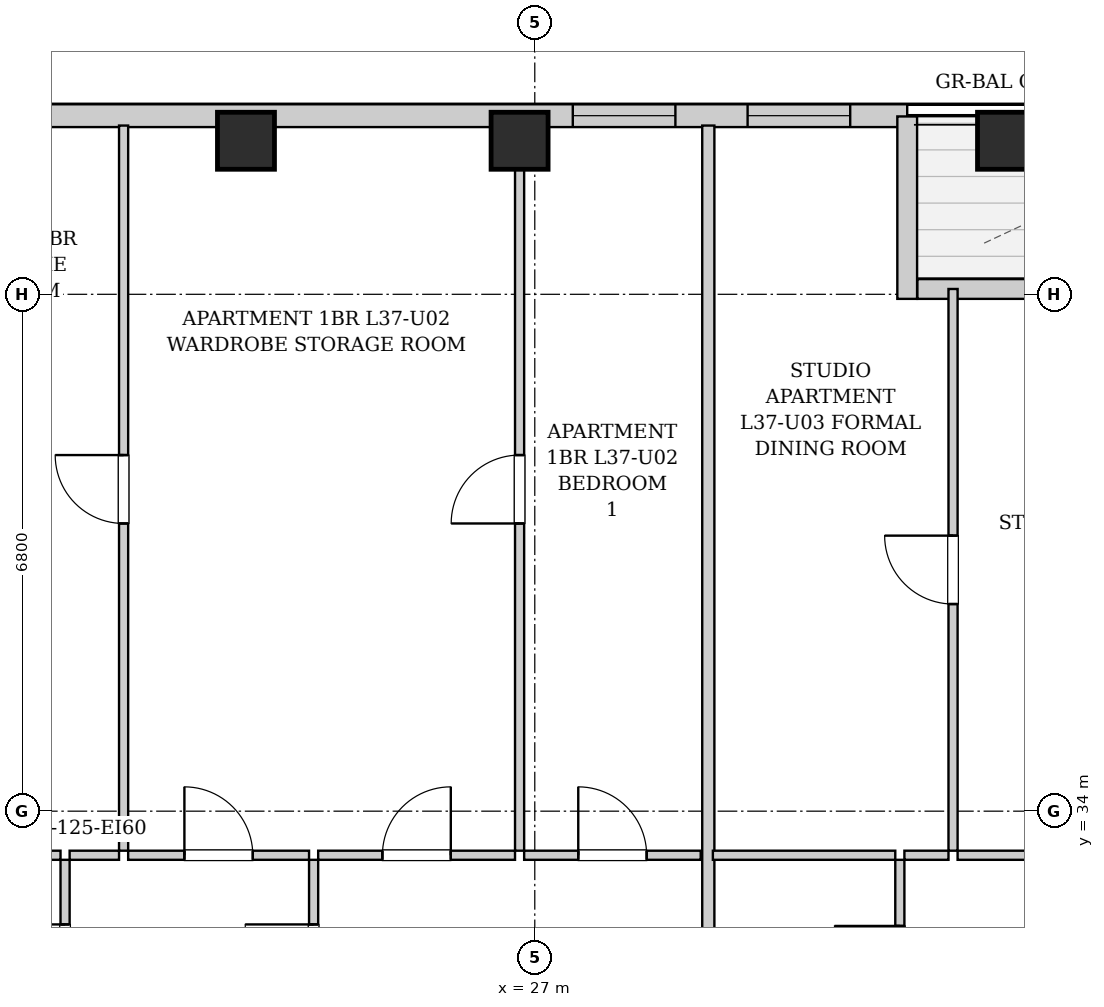
"""IFC4 building model, lengths in metres.
Left out: names, types, materials, properties, quantities, classifications, styles, units other than length and angle.
Written with IfcOpenShell. Run it as: python <this file> out.ifc"""

import sys

from ifc_helpers import new_model, si_unit, direction, frame, frame_2d, origin, origin_2d, place, context, subcontext, project, spatial, rectangle, extrude, element, fill, save


model = new_model("IFC4")
c1 = context("Model", 3, precision=1e-05, world=origin(), true_north=direction((0.0, 1.0)))
c2 = subcontext(c1, "Body", "Model", "MODEL_VIEW")
j1 = project(units=[si_unit("LENGTHUNIT", "METRE"), si_unit("PLANEANGLEUNIT", "RADIAN")], contexts=[c1])
p1 = place(None, origin())
s1 = spatial("IfcSite", under=j1, at=p1, CompositionType="ELEMENT")
p2 = place(p1, origin())
s2 = spatial("IfcBuilding", under=s1, at=p2, CompositionType="ELEMENT")
p3 = place(p2, frame((0.0, 0.0, 130.9)))
s3 = spatial("IfcBuildingStorey", under=s2, at=p3, CompositionType="ELEMENT", Elevation=130.9)
for number, where, z_axis, x_axis in (
    (1, (23.2, 42.82, 0.0), (0.0, 0.0, 1.0), (1.0, 0.0, 0.0)),
    (2, (26.8, 42.82, 0.0), (0.0, 0.0, 1.0), (1.0, 0.0, 0.0)),
    (3, (33.2, 42.82, 0.0), (0.0, 0.0, 1.0), (1.0, 0.0, 0.0)),
):
    element("IfcColumn", number, at=place(p3, frame(where, z_axis=z_axis, x_axis=x_axis)), inside=s3, PredefinedType="COLUMN", context=c2, shape_type="SweptSolid", body=[
        extrude(rectangle(XDim=0.75, YDim=0.75, at=origin_2d()), origin(), (0.0, 0.0, 1.0), 3.25),
    ])
p4 = place(p3, frame((10.0, 43.15, 0.0), z_axis=(0.0, 0.0, 1.0), x_axis=(1.0, 0.0, 0.0)))
e4 = element("IfcWall", 4, at=p4, inside=s3, PredefinedType="SOLIDWALL", context=c2, shape_type="SweptSolid", body=[
    extrude(rectangle(XDim=21.9, YDim=0.3, at=frame_2d((10.95, 0.0))), origin(), (0.0, 0.0, 1.0), 2.99),
])
p5 = place(p4, frame((5.475, 0.0, 0.55)))
e5 = element("IfcOpeningElement", 5, at=p5, cuts=e4, PredefinedType="OPENING", context=c2, shape_type="SweptSolid", body=[
    extrude(rectangle(XDim=1.35, YDim=1.2, at=frame_2d((0.675, 0.6))), frame((0.0, 0.16, 0.0), z_axis=(0.0, -1.0, 0.0), x_axis=(1.0, 0.0, 0.0)), (0.0, 0.0, 1.0), 0.32),
])
p6 = place(p4, frame((9.15, 0.0, 0.55)))
e6 = element("IfcOpeningElement", 6, at=p6, cuts=e4, PredefinedType="OPENING", context=c2, shape_type="SweptSolid", body=[
    extrude(rectangle(XDim=1.35, YDim=1.2, at=frame_2d((0.675, 0.6))), frame((0.0, 0.16, 0.0), z_axis=(0.0, -1.0, 0.0), x_axis=(1.0, 0.0, 0.0)), (0.0, 0.0, 1.0), 0.32),
])
p7 = place(p4, frame((17.5, 0.0, 0.55)))
e7 = element("IfcOpeningElement", 7, at=p7, cuts=e4, PredefinedType="OPENING", context=c2, shape_type="SweptSolid", body=[
    extrude(rectangle(XDim=1.35, YDim=1.2, at=frame_2d((0.675, 0.6))), frame((0.0, 0.16, 0.0), z_axis=(0.0, -1.0, 0.0), x_axis=(1.0, 0.0, 0.0)), (0.0, 0.0, 1.0), 0.32),
])
p8 = place(p4, frame((19.8, 0.0, 0.55)))
e8 = element("IfcOpeningElement", 8, at=p8, cuts=e4, PredefinedType="OPENING", context=c2, shape_type="SweptSolid", body=[
    extrude(rectangle(XDim=1.35, YDim=1.2, at=frame_2d((0.675, 0.6))), frame((0.0, 0.16, 0.0), z_axis=(0.0, -1.0, 0.0), x_axis=(1.0, 0.0, 0.0)), (0.0, 0.0, 1.0), 0.32),
])
p9 = place(p3, frame((31.9, 43.14, 0.0), z_axis=(0.0, 0.0, 1.0), x_axis=(0.0, -1.0, 0.0)))
e9 = element("IfcWall", 9, at=p9, inside=s3, PredefinedType="SOLIDWALL", context=c2, shape_type="SweptSolid", body=[
    extrude(rectangle(XDim=2.4, YDim=0.26, at=frame_2d((1.2, 0.0))), origin(), (0.0, 0.0, 1.0), 2.99),
])
p10 = place(p3, frame((32.034, 40.87, 0.0), z_axis=(0.0, 0.0, 1.0), x_axis=(1.0, 0.0, 0.0)))
e10 = element("IfcWall", 10, at=p10, inside=s3, PredefinedType="SOLIDWALL", context=c2, shape_type="SweptSolid", body=[
    extrude(rectangle(XDim=4.332, YDim=0.26, at=frame_2d((2.166, 0.0))), origin(), (0.0, 0.0, 1.0), 2.99),
])
p11 = place(p10, frame((1.616, 0.0, 0.0)))
e11 = element("IfcOpeningElement", 11, at=p11, cuts=e10, PredefinedType="OPENING", context=c2, shape_type="SweptSolid", body=[
    extrude(rectangle(XDim=1.1, YDim=2.0, at=frame_2d((0.55, 1.0))), frame((0.0, 0.14, 0.0), z_axis=(0.0, -1.0, 0.0), x_axis=(1.0, 0.0, 0.0)), (0.0, 0.0, 1.0), 0.28),
])
p12 = place(p3, frame((20.82, 30.76, 0.0), z_axis=(0.0, 0.0, 1.0), x_axis=(0.0, 1.0, 0.0)))
e12 = element("IfcWall", 12, at=p12, inside=s3, PredefinedType="PARTITIONING", context=c2, shape_type="SweptSolid", body=[
    extrude(rectangle(XDim=2.6, YDim=0.12, at=frame_2d((1.3, 0.0))), origin(), (0.0, 0.0, 1.0), 2.99),
])
p13 = place(p12, frame((0.85, 0.0, 0.0)))
e13 = element("IfcOpeningElement", 13, at=p13, cuts=e12, PredefinedType="OPENING", context=c2, shape_type="SweptSolid", body=[
    extrude(rectangle(XDim=0.9, YDim=2.05, at=frame_2d((0.45, 1.025))), frame((0.0, 0.07, 0.0), z_axis=(0.0, -1.0, 0.0), x_axis=(1.0, 0.0, 0.0)), (0.0, 0.0, 1.0), 0.14),
])
p14 = place(p3, frame((18.165, 33.42, 0.0), z_axis=(0.0, 0.0, 1.0), x_axis=(1.0, 0.0, 0.0)))
e14 = element("IfcWall", 14, at=p14, inside=s3, PredefinedType="PARTITIONING", context=c2, shape_type="SweptSolid", body=[
    extrude(rectangle(XDim=2.595, YDim=0.12, at=frame_2d((1.297, 0.0))), origin(), (0.0, 0.0, 1.0), 2.99),
])
p15 = place(p14, frame((0.847, 0.0, 0.0)))
e15 = element("IfcOpeningElement", 15, at=p15, cuts=e14, PredefinedType="OPENING", context=c2, shape_type="SweptSolid", body=[
    extrude(rectangle(XDim=0.9, YDim=2.05, at=frame_2d((0.45, 1.025))), frame((0.0, 0.07, 0.0), z_axis=(0.0, -1.0, 0.0), x_axis=(1.0, 0.0, 0.0)), (0.0, 0.0, 1.0), 0.14),
])
p16 = place(p3, frame((24.09, 30.76, 0.0), z_axis=(0.0, 0.0, 1.0), x_axis=(0.0, 1.0, 0.0)))
e16 = element("IfcWall", 16, at=p16, inside=s3, PredefinedType="PARTITIONING", context=c2, shape_type="SweptSolid", body=[
    extrude(rectangle(XDim=2.6, YDim=0.12, at=frame_2d((1.3, 0.0))), origin(), (0.0, 0.0, 1.0), 2.99),
])
p17 = place(p16, frame((0.85, 0.0, 0.0)))
e17 = element("IfcOpeningElement", 17, at=p17, cuts=e16, PredefinedType="OPENING", context=c2, shape_type="SweptSolid", body=[
    extrude(rectangle(XDim=0.9, YDim=2.05, at=frame_2d((0.45, 1.025))), frame((0.0, 0.07, 0.0), z_axis=(0.0, -1.0, 0.0), x_axis=(1.0, 0.0, 0.0)), (0.0, 0.0, 1.0), 0.14),
])
p18 = place(p3, frame((20.88, 33.42, 0.0), z_axis=(0.0, 0.0, 1.0), x_axis=(1.0, 0.0, 0.0)))
e18 = element("IfcWall", 18, at=p18, inside=s3, PredefinedType="PARTITIONING", context=c2, shape_type="SweptSolid", body=[
    extrude(rectangle(XDim=0.65, YDim=0.12, at=frame_2d((0.325, 0.0))), origin(), (0.0, 0.0, 1.0), 2.99),
])
p19 = place(p3, frame((21.65, 33.42, 0.0), z_axis=(0.0, 0.0, 1.0), x_axis=(1.0, 0.0, 0.0)))
e19 = element("IfcWall", 19, at=p19, inside=s3, PredefinedType="PARTITIONING", context=c2, shape_type="SweptSolid", body=[
    extrude(rectangle(XDim=2.38, YDim=0.12, at=frame_2d((1.19, 0.0))), origin(), (0.0, 0.0, 1.0), 2.99),
])
p20 = place(p19, frame((0.74, 0.0, 0.0)))
e20 = element("IfcOpeningElement", 20, at=p20, cuts=e19, PredefinedType="OPENING", context=c2, shape_type="SweptSolid", body=[
    extrude(rectangle(XDim=0.9, YDim=2.05, at=frame_2d((0.45, 1.025))), frame((0.0, 0.07, 0.0), z_axis=(0.0, -1.0, 0.0), x_axis=(1.0, 0.0, 0.0)), (0.0, 0.0, 1.0), 0.14),
])
p21 = place(p3, frame((24.15, 33.42, 0.0), z_axis=(0.0, 0.0, 1.0), x_axis=(1.0, 0.0, 0.0)))
e21 = element("IfcWall", 21, at=p21, inside=s3, PredefinedType="PARTITIONING", context=c2, shape_type="SweptSolid", body=[
    extrude(rectangle(XDim=2.59, YDim=0.12, at=frame_2d((1.295, 0.0))), origin(), (0.0, 0.0, 1.0), 2.99),
])
p22 = place(p21, frame((0.845, 0.0, 0.0)))
e22 = element("IfcOpeningElement", 22, at=p22, cuts=e21, PredefinedType="OPENING", context=c2, shape_type="SweptSolid", body=[
    extrude(rectangle(XDim=0.9, YDim=2.05, at=frame_2d((0.45, 1.025))), frame((0.0, 0.07, 0.0), z_axis=(0.0, -1.0, 0.0), x_axis=(1.0, 0.0, 0.0)), (0.0, 0.0, 1.0), 0.14),
])
p23 = place(p3, frame((26.86, 33.42, 0.0), z_axis=(0.0, 0.0, 1.0), x_axis=(1.0, 0.0, 0.0)))
e23 = element("IfcWall", 23, at=p23, inside=s3, PredefinedType="PARTITIONING", context=c2, shape_type="SweptSolid", body=[
    extrude(rectangle(XDim=2.323, YDim=0.12, at=frame_2d((1.162, 0.0))), origin(), (0.0, 0.0, 1.0), 2.99),
])
p24 = place(p23, frame((0.712, 0.0, 0.0)))
e24 = element("IfcOpeningElement", 24, at=p24, cuts=e23, PredefinedType="OPENING", context=c2, shape_type="SweptSolid", body=[
    extrude(rectangle(XDim=0.9, YDim=2.05, at=frame_2d((0.45, 1.025))), frame((0.0, 0.07, 0.0), z_axis=(0.0, -1.0, 0.0), x_axis=(1.0, 0.0, 0.0)), (0.0, 0.0, 1.0), 0.14),
])
p25 = place(p3, frame((21.59, 33.48, 0.0), z_axis=(0.0, 0.0, 1.0), x_axis=(0.0, 1.0, 0.0)))
e25 = element("IfcWall", 25, at=p25, inside=s3, PredefinedType="PARTITIONING", context=c2, shape_type="SweptSolid", body=[
    extrude(rectangle(XDim=9.54, YDim=0.12, at=frame_2d((4.77, 0.0))), origin(), (0.0, 0.0, 1.0), 2.99),
])
p26 = place(p25, frame((4.305, 0.0, 0.0)))
e26 = element("IfcOpeningElement", 26, at=p26, cuts=e25, PredefinedType="OPENING", context=c2, shape_type="SweptSolid", body=[
    extrude(rectangle(XDim=0.9, YDim=2.05, at=frame_2d((0.45, 1.025))), frame((0.0, 0.07, 0.0), z_axis=(0.0, -1.0, 0.0), x_axis=(1.0, 0.0, 0.0)), (0.0, 0.0, 1.0), 0.14),
])
p27 = place(p3, frame((26.8, 33.48, 0.0), z_axis=(0.0, 0.0, 1.0), x_axis=(0.0, 1.0, 0.0)))
e27 = element("IfcWall", 27, at=p27, inside=s3, PredefinedType="PARTITIONING", context=c2, shape_type="SweptSolid", body=[
    extrude(rectangle(XDim=9.54, YDim=0.12, at=frame_2d((4.77, 0.0))), origin(), (0.0, 0.0, 1.0), 2.99),
])
p28 = place(p27, frame((4.305, 0.0, 0.0)))
e28 = element("IfcOpeningElement", 28, at=p28, cuts=e27, PredefinedType="OPENING", context=c2, shape_type="SweptSolid", body=[
    extrude(rectangle(XDim=0.9, YDim=2.05, at=frame_2d((0.45, 1.025))), frame((0.0, 0.07, 0.0), z_axis=(0.0, -1.0, 0.0), x_axis=(1.0, 0.0, 0.0)), (0.0, 0.0, 1.0), 0.14),
])
p29 = place(p3, frame((29.283, 30.76, 0.0), z_axis=(0.0, 0.0, 1.0), x_axis=(0.0, 1.0, 0.0)))
e29 = element("IfcWall", 29, at=p29, inside=s3, PredefinedType="PARTITIONING", context=c2, shape_type="SweptSolid", body=[
    extrude(rectangle(XDim=12.26, YDim=0.16, at=frame_2d((6.13, 0.0))), origin(), (0.0, 0.0, 1.0), 2.99),
])
p30 = place(p3, frame((31.803, 30.76, 0.0), z_axis=(0.0, 0.0, 1.0), x_axis=(0.0, 1.0, 0.0)))
e30 = element("IfcWall", 30, at=p30, inside=s3, PredefinedType="PARTITIONING", context=c2, shape_type="SweptSolid", body=[
    extrude(rectangle(XDim=2.6, YDim=0.12, at=frame_2d((1.3, 0.0))), origin(), (0.0, 0.0, 1.0), 2.99),
])
p31 = place(p30, frame((0.87, 0.0, 0.0)))
e31 = element("IfcOpeningElement", 31, at=p31, cuts=e30, PredefinedType="OPENING", context=c2, shape_type="SweptSolid", body=[
    extrude(rectangle(XDim=0.86, YDim=2.05, at=frame_2d((0.43, 1.025))), frame((0.0, 0.07, 0.0), z_axis=(0.0, -1.0, 0.0), x_axis=(1.0, 0.0, 0.0)), (0.0, 0.0, 1.0), 0.14),
])
p32 = place(p3, frame((29.343, 33.42, 0.0), z_axis=(0.0, 0.0, 1.0), x_axis=(1.0, 0.0, 0.0)))
e32 = element("IfcWall", 32, at=p32, inside=s3, PredefinedType="PARTITIONING", context=c2, shape_type="SweptSolid", body=[
    extrude(rectangle(XDim=2.4, YDim=0.12, at=frame_2d((1.2, 0.0))), origin(), (0.0, 0.0, 1.0), 2.99),
])
p33 = place(p3, frame((31.863, 33.42, 0.0), z_axis=(0.0, 0.0, 1.0), x_axis=(1.0, 0.0, 0.0)))
e33 = element("IfcWall", 33, at=p33, inside=s3, PredefinedType="PARTITIONING", context=c2, shape_type="SweptSolid", body=[
    extrude(rectangle(XDim=0.58, YDim=0.12, at=frame_2d((0.29, 0.0))), origin(), (0.0, 0.0, 1.0), 2.99),
])
p34 = place(p3, frame((32.563, 33.42, 0.0), z_axis=(0.0, 0.0, 1.0), x_axis=(1.0, 0.0, 0.0)))
e34 = element("IfcWall", 34, at=p34, inside=s3, PredefinedType="PARTITIONING", context=c2, shape_type="SweptSolid", body=[
    extrude(rectangle(XDim=2.75, YDim=0.12, at=frame_2d((1.375, 0.0))), origin(), (0.0, 0.0, 1.0), 2.99),
])
p35 = place(p34, frame((0.925, 0.0, 0.0)))
e35 = element("IfcOpeningElement", 35, at=p35, cuts=e34, PredefinedType="OPENING", context=c2, shape_type="SweptSolid", body=[
    extrude(rectangle(XDim=0.9, YDim=2.05, at=frame_2d((0.45, 1.025))), frame((0.0, 0.07, 0.0), z_axis=(0.0, -1.0, 0.0), x_axis=(1.0, 0.0, 0.0)), (0.0, 0.0, 1.0), 0.14),
])
p36 = place(p3, frame((32.503, 33.48, 0.0), z_axis=(0.0, 0.0, 1.0), x_axis=(0.0, 1.0, 0.0)))
e36 = element("IfcWall", 36, at=p36, inside=s3, PredefinedType="PARTITIONING", context=c2, shape_type="SweptSolid", body=[
    extrude(rectangle(XDim=7.39, YDim=0.12, at=frame_2d((3.695, 0.0))), origin(), (0.0, 0.0, 1.0), 2.99),
])
p37 = place(p36, frame((3.245, 0.0, 0.0)))
e37 = element("IfcOpeningElement", 37, at=p37, cuts=e36, PredefinedType="OPENING", context=c2, shape_type="SweptSolid", body=[
    extrude(rectangle(XDim=0.9, YDim=2.05, at=frame_2d((0.45, 1.025))), frame((0.0, 0.07, 0.0), z_axis=(0.0, -1.0, 0.0), x_axis=(1.0, 0.0, 0.0)), (0.0, 0.0, 1.0), 0.14),
])
p38 = place(p13, origin())
e38 = element("IfcDoor", 38, at=p38, inside=s3, OperationType="SINGLE_SWING_RIGHT", PredefinedType="DOOR", context=c2, shape_type="SweptSolid", body=[
    extrude(rectangle(XDim=0.9, YDim=2.05, at=frame_2d((0.45, 1.025))), frame((0.0, 0.025, 0.0), z_axis=(0.0, -1.0, 0.0), x_axis=(1.0, 0.0, 0.0)), (0.0, 0.0, 1.0), 0.05),
])
fill(e13, e38)
p39 = place(p17, origin())
e39 = element("IfcDoor", 39, at=p39, inside=s3, OperationType="SINGLE_SWING_RIGHT", PredefinedType="DOOR", context=c2, shape_type="SweptSolid", body=[
    extrude(rectangle(XDim=0.9, YDim=2.05, at=frame_2d((0.45, 1.025))), frame((0.0, 0.025, 0.0), z_axis=(0.0, -1.0, 0.0), x_axis=(1.0, 0.0, 0.0)), (0.0, 0.0, 1.0), 0.05),
])
fill(e17, e39)
p40 = place(p20, origin())
e40 = element("IfcDoor", 40, at=p40, inside=s3, OperationType="SINGLE_SWING_LEFT", PredefinedType="DOOR", context=c2, shape_type="SweptSolid", body=[
    extrude(rectangle(XDim=0.9, YDim=2.05, at=frame_2d((0.45, 1.025))), frame((0.0, 0.025, 0.0), z_axis=(0.0, -1.0, 0.0), x_axis=(1.0, 0.0, 0.0)), (0.0, 0.0, 1.0), 0.05),
])
fill(e20, e40)
p41 = place(p22, origin())
e41 = element("IfcDoor", 41, at=p41, inside=s3, OperationType="SINGLE_SWING_RIGHT", PredefinedType="DOOR", context=c2, shape_type="SweptSolid", body=[
    extrude(rectangle(XDim=0.9, YDim=2.05, at=frame_2d((0.45, 1.025))), frame((0.0, 0.025, 0.0), z_axis=(0.0, -1.0, 0.0), x_axis=(1.0, 0.0, 0.0)), (0.0, 0.0, 1.0), 0.05),
])
fill(e22, e41)
p42 = place(p24, origin())
e42 = element("IfcDoor", 42, at=p42, inside=s3, OperationType="SINGLE_SWING_LEFT", PredefinedType="DOOR", context=c2, shape_type="SweptSolid", body=[
    extrude(rectangle(XDim=0.9, YDim=2.05, at=frame_2d((0.45, 1.025))), frame((0.0, 0.025, 0.0), z_axis=(0.0, -1.0, 0.0), x_axis=(1.0, 0.0, 0.0)), (0.0, 0.0, 1.0), 0.05),
])
fill(e24, e42)
p43 = place(p26, origin())
e43 = element("IfcDoor", 43, at=p43, inside=s3, OperationType="SINGLE_SWING_RIGHT", PredefinedType="DOOR", context=c2, shape_type="SweptSolid", body=[
    extrude(rectangle(XDim=0.9, YDim=2.05, at=frame_2d((0.45, 1.025))), frame((0.0, 0.025, 0.0), z_axis=(0.0, -1.0, 0.0), x_axis=(1.0, 0.0, 0.0)), (0.0, 0.0, 1.0), 0.05),
])
fill(e26, e43)
p44 = place(p28, origin())
e44 = element("IfcDoor", 44, at=p44, inside=s3, OperationType="SINGLE_SWING_LEFT", PredefinedType="DOOR", context=c2, shape_type="SweptSolid", body=[
    extrude(rectangle(XDim=0.9, YDim=2.05, at=frame_2d((0.45, 1.025))), frame((0.0, 0.025, 0.0), z_axis=(0.0, -1.0, 0.0), x_axis=(1.0, 0.0, 0.0)), (0.0, 0.0, 1.0), 0.05),
])
fill(e28, e44)
p45 = place(p31, origin())
e45 = element("IfcDoor", 45, at=p45, inside=s3, OperationType="SINGLE_SWING_RIGHT", PredefinedType="DOOR", context=c2, shape_type="SweptSolid", body=[
    extrude(rectangle(XDim=0.86, YDim=2.05, at=frame_2d((0.43, 1.025))), frame((0.0, 0.025, 0.0), z_axis=(0.0, -1.0, 0.0), x_axis=(1.0, 0.0, 0.0)), (0.0, 0.0, 1.0), 0.05),
])
fill(e31, e45)
p46 = place(p37, origin())
e46 = element("IfcDoor", 46, at=p46, inside=s3, OperationType="SINGLE_SWING_RIGHT", PredefinedType="DOOR", context=c2, shape_type="SweptSolid", body=[
    extrude(rectangle(XDim=0.9, YDim=2.05, at=frame_2d((0.45, 1.025))), frame((0.0, 0.025, 0.0), z_axis=(0.0, -1.0, 0.0), x_axis=(1.0, 0.0, 0.0)), (0.0, 0.0, 1.0), 0.05),
])
fill(e37, e46)
p47 = place(p7, origin())
e47 = element("IfcWindow", 47, at=p47, inside=s3, PartitioningType="SINGLE_PANEL", PredefinedType="WINDOW", context=c2, shape_type="SweptSolid", body=[
    extrude(rectangle(XDim=1.35, YDim=1.2, at=frame_2d((0.675, 0.6))), frame((0.0, 0.03, 0.0), z_axis=(0.0, -1.0, 0.0), x_axis=(1.0, 0.0, 0.0)), (0.0, 0.0, 1.0), 0.06),
])
fill(e7, e47)
p48 = place(p8, origin())
e48 = element("IfcWindow", 48, at=p48, inside=s3, PartitioningType="SINGLE_PANEL", PredefinedType="WINDOW", context=c2, shape_type="SweptSolid", body=[
    extrude(rectangle(XDim=1.35, YDim=1.2, at=frame_2d((0.675, 0.6))), frame((0.0, 0.03, 0.0), z_axis=(0.0, -1.0, 0.0), x_axis=(1.0, 0.0, 0.0)), (0.0, 0.0, 1.0), 0.06),
])
fill(e8, e48)
save(model, sys.argv[1])
